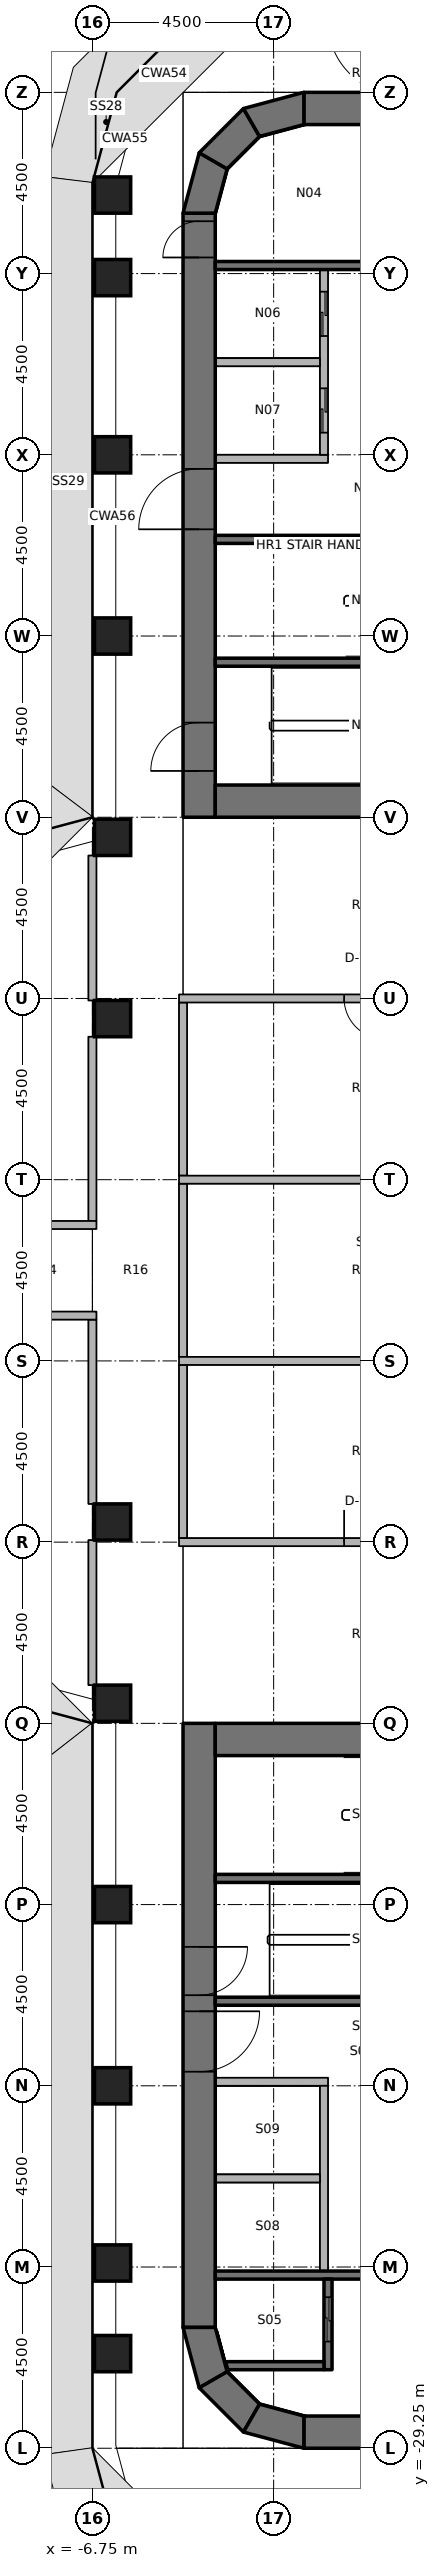
"""IFC4 building model, lengths in metres.
Left out: names, types, materials, properties, quantities, classifications, styles, units other than length and angle.
Written with IfcOpenShell. Run it as: python <this file> out.ifc"""

import sys

from ifc_helpers import new_model, si_unit, direction, frame, frame_2d, origin, origin_2d, place, context, subcontext, project, spatial, polyline, rectangle, outline, extrude, element, fill, save


model = new_model("IFC4")
c1 = context("Model", 3, precision=1e-05, world=origin(), true_north=direction((0.0, 1.0)))
c2 = subcontext(c1, "Body", "Model", "MODEL_VIEW")
j1 = project(units=[si_unit("LENGTHUNIT", "METRE"), si_unit("PLANEANGLEUNIT", "RADIAN")], contexts=[c1])
p1 = place(None, origin())
s1 = spatial("IfcSite", under=j1, at=p1, CompositionType="ELEMENT")
p2 = place(p1, origin())
s2 = spatial("IfcBuilding", under=s1, at=p2, CompositionType="ELEMENT")
p3 = place(p2, frame((0.0, 0.0, 94.2)))
s3 = spatial("IfcBuildingStorey", under=s2, at=p3, CompositionType="ELEMENT", Elevation=94.2)
for number, where, z_axis, x_axis in (
    (1, (-6.25, -26.9, 0.0), (0.0, 0.0, 1.0), (1.0, 0.0, 0.0)),
    (2, (-6.25, -24.65, 0.0), (0.0, 0.0, 1.0), (1.0, 0.0, 0.0)),
    (3, (-6.25, -20.25, 0.0), (0.0, 0.0, 1.0), (1.0, 0.0, 0.0)),
    (4, (-6.25, -15.75, 0.0), (0.0, 0.0, 1.0), (1.0, 0.0, 0.0)),
    (5, (-6.25, -10.75, 0.0), (0.0, 0.0, 1.0), (1.0, 0.0, 0.0)),
    (6, (-6.25, -6.25, 0.0), (0.0, 0.0, 1.0), (1.0, 0.0, 0.0)),
    (7, (-6.25, 6.25, 0.0), (0.0, 0.0, 1.0), (1.0, 0.0, 0.0)),
    (8, (-6.25, 10.75, 0.0), (0.0, 0.0, 1.0), (1.0, 0.0, 0.0)),
    (9, (-6.25, 15.75, 0.0), (0.0, 0.0, 1.0), (1.0, 0.0, 0.0)),
    (10, (-6.25, 20.25, 0.0), (0.0, 0.0, 1.0), (1.0, 0.0, 0.0)),
    (11, (-6.25, 24.65, 0.0), (0.0, 0.0, 1.0), (1.0, 0.0, 0.0)),
    (12, (-6.25, 26.7, 0.0), (0.0, 0.0, 1.0), (1.0, 0.0, 0.0)),
):
    element("IfcColumn", number, at=place(p3, frame(where, z_axis=z_axis, x_axis=x_axis)), inside=s3, PredefinedType="COLUMN", context=c2, shape_type="SweptSolid", body=[
        extrude(rectangle(XDim=0.9, YDim=0.9, at=origin_2d()), origin(), (0.0, 0.0, 1.0), 3.65),
    ])
p4 = place(p3, frame((-4.1, 11.25, 0.0), z_axis=(0.0, 0.0, 1.0), x_axis=(0.0, 1.0, 0.0)))
e13 = element("IfcWall", 13, at=p4, inside=s3, PredefinedType="SHEAR", context=c2, shape_type="SweptSolid", body=[
    extrude(rectangle(XDim=15.0, YDim=0.8, at=frame_2d((7.5, 0.0))), origin(), (0.0, 0.0, 1.0), 3.8),
])
p5 = place(p4, frame((7.15, 0.0, 0.0)))
e14 = element("IfcOpeningElement", 14, at=p5, cuts=e13, PredefinedType="OPENING", context=c2, shape_type="SweptSolid", body=[
    extrude(rectangle(XDim=1.5, YDim=2.3, at=frame_2d((0.75, 1.15))), frame((0.0, 0.41, 0.0), z_axis=(0.0, -1.0, 0.0), x_axis=(1.0, 0.0, 0.0)), (0.0, 0.0, 1.0), 0.82),
])
p6 = place(p4, frame((13.9, 0.0, 0.0)))
e15 = element("IfcOpeningElement", 15, at=p6, cuts=e13, PredefinedType="OPENING", context=c2, shape_type="SweptSolid", body=[
    extrude(rectangle(XDim=0.9, YDim=2.1, at=frame_2d((0.45, 1.05))), frame((0.0, 0.41, 0.0), z_axis=(0.0, -1.0, 0.0), x_axis=(1.0, 0.0, 0.0)), (0.0, 0.0, 1.0), 0.82),
])
p7 = place(p4, frame((1.15, 0.0, 0.0)))
e16 = element("IfcOpeningElement", 16, at=p7, cuts=e13, PredefinedType="OPENING", context=c2, shape_type="SweptSolid", body=[
    extrude(rectangle(XDim=1.2, YDim=2.1, at=frame_2d((0.6, 1.05))), frame((0.0, 0.41, 0.0), z_axis=(0.0, -1.0, 0.0), x_axis=(1.0, 0.0, 0.0)), (0.0, 0.0, 1.0), 0.82),
])
p8 = place(p3, frame((-3.7, 11.65, 0.0), z_axis=(0.0, 0.0, 1.0), x_axis=(1.0, 0.0, 0.0)))
e17 = element("IfcWall", 17, at=p8, inside=s3, PredefinedType="SHEAR", context=c2, shape_type="SweptSolid", body=[
    extrude(rectangle(XDim=7.4, YDim=0.8, at=frame_2d((3.7, 0.0))), origin(), (0.0, 0.0, 1.0), 3.8),
])
p9 = place(p3, frame((-1.5, 28.85, 0.0), z_axis=(0.0, 0.0, 1.0), x_axis=(1.0, 0.0, 0.0)))
e18 = element("IfcWall", 18, at=p9, inside=s3, PredefinedType="SHEAR", context=c2, shape_type="SweptSolid", body=[
    extrude(rectangle(XDim=3.0, YDim=0.8, at=frame_2d((1.5, 0.0))), origin(), (0.0, 0.0, 1.0), 3.8),
])
p10 = place(p3, origin())
e19 = element("IfcWall", 19, at=p10, inside=s3, PredefinedType="SHEAR", context=c2, shape_type="SweptSolid", body=[
    extrude(outline(polyline([(-4.5, 26.25), (-4.098, 27.75), (-3.405, 27.35), (-3.7, 26.25), (-4.5, 26.25)])), origin(), (0.0, 0.0, 1.0), 3.8),
])
p11 = place(p3, origin())
e20 = element("IfcWall", 20, at=p11, inside=s3, PredefinedType="SHEAR", context=c2, shape_type="SweptSolid", body=[
    extrude(outline(polyline([(-4.098, 27.75), (-3.0, 28.848), (-2.6, 28.155), (-3.405, 27.35), (-4.098, 27.75)])), origin(), (0.0, 0.0, 1.0), 3.8),
])
p12 = place(p3, origin())
e21 = element("IfcWall", 21, at=p12, inside=s3, PredefinedType="SHEAR", context=c2, shape_type="SweptSolid", body=[
    extrude(outline(polyline([(-3.0, 28.848), (-1.5, 29.25), (-1.5, 28.45), (-2.6, 28.155), (-3.0, 28.848)])), origin(), (0.0, 0.0, 1.0), 3.8),
])
p13 = place(p3, frame((-4.1, -11.25, 0.0), z_axis=(0.0, 0.0, 1.0), x_axis=(0.0, -1.0, 0.0)))
e22 = element("IfcWall", 22, at=p13, inside=s3, PredefinedType="SHEAR", context=c2, shape_type="SweptSolid", body=[
    extrude(rectangle(XDim=15.0, YDim=0.8, at=frame_2d((7.5, 0.0))), origin(), (0.0, 0.0, 1.0), 3.8),
])
p14 = place(p13, frame((7.15, 0.0, 0.0)))
e23 = element("IfcOpeningElement", 23, at=p14, cuts=e22, PredefinedType="OPENING", context=c2, shape_type="SweptSolid", body=[
    extrude(rectangle(XDim=1.5, YDim=2.3, at=frame_2d((0.75, 1.15))), frame((0.0, 0.41, 0.0), z_axis=(0.0, -1.0, 0.0), x_axis=(1.0, 0.0, 0.0)), (0.0, 0.0, 1.0), 0.82),
])
p15 = place(p13, frame((5.55, 0.0, 0.0)))
e24 = element("IfcOpeningElement", 24, at=p15, cuts=e22, PredefinedType="OPENING", context=c2, shape_type="SweptSolid", body=[
    extrude(rectangle(XDim=1.2, YDim=2.1, at=frame_2d((0.6, 1.05))), frame((0.0, 0.41, 0.0), z_axis=(0.0, -1.0, 0.0), x_axis=(1.0, 0.0, 0.0)), (0.0, 0.0, 1.0), 0.82),
])
p16 = place(p3, frame((-3.7, -11.65, 0.0), z_axis=(0.0, 0.0, 1.0), x_axis=(1.0, 0.0, 0.0)))
e25 = element("IfcWall", 25, at=p16, inside=s3, PredefinedType="SHEAR", context=c2, shape_type="SweptSolid", body=[
    extrude(rectangle(XDim=7.4, YDim=0.8, at=frame_2d((3.7, 0.0))), origin(), (0.0, 0.0, 1.0), 3.8),
])
p17 = place(p3, frame((-1.5, -28.85, 0.0), z_axis=(0.0, 0.0, 1.0), x_axis=(1.0, 0.0, 0.0)))
e26 = element("IfcWall", 26, at=p17, inside=s3, PredefinedType="SHEAR", context=c2, shape_type="SweptSolid", body=[
    extrude(rectangle(XDim=3.0, YDim=0.8, at=frame_2d((1.5, 0.0))), origin(), (0.0, 0.0, 1.0), 3.8),
])
p18 = place(p3, origin())
e27 = element("IfcWall", 27, at=p18, inside=s3, PredefinedType="SHEAR", context=c2, shape_type="SweptSolid", body=[
    extrude(outline(polyline([(-4.5, -26.25), (-4.098, -27.75), (-3.405, -27.35), (-3.7, -26.25), (-4.5, -26.25)])), origin(), (0.0, 0.0, 1.0), 3.8),
])
p19 = place(p3, origin())
e28 = element("IfcWall", 28, at=p19, inside=s3, PredefinedType="SHEAR", context=c2, shape_type="SweptSolid", body=[
    extrude(outline(polyline([(-4.098, -27.75), (-3.0, -28.848), (-2.6, -28.155), (-3.405, -27.35), (-4.098, -27.75)])), origin(), (0.0, 0.0, 1.0), 3.8),
])
p20 = place(p3, origin())
e29 = element("IfcWall", 29, at=p20, inside=s3, PredefinedType="SHEAR", context=c2, shape_type="SweptSolid", body=[
    extrude(outline(polyline([(-3.0, -28.848), (-1.5, -29.25), (-1.5, -28.45), (-2.6, -28.155), (-3.0, -28.848)])), origin(), (0.0, 0.0, 1.0), 3.8),
])
for number, where, z_axis, x_axis in (
    (30, (-3.7, 24.95, 0.0), (0.0, 0.0, 1.0), (1.0, 0.0, 0.0)),
    (31, (-3.7, 18.15, 0.0), (0.0, 0.0, 1.0), (1.0, 0.0, 0.0)),
    (32, (-3.7, 15.1, 0.0), (0.0, 0.0, 1.0), (1.0, 0.0, 0.0)),
):
    element("IfcWall", number, at=place(p3, frame(where, z_axis=z_axis, x_axis=x_axis)), inside=s3, PredefinedType="SHEAR", context=c2, shape_type="SweptSolid", body=[
        extrude(rectangle(XDim=7.4, YDim=0.2, at=frame_2d((3.7, 0.0))), origin(), (0.0, 0.0, 1.0), 3.65),
    ])
p21 = place(p3, frame((-3.7, 20.15, 0.0), z_axis=(0.0, 0.0, 1.0), x_axis=(1.0, 0.0, 0.0)))
e33 = element("IfcWall", 33, at=p21, inside=s3, PredefinedType="PARTITIONING", context=c2, shape_type="SweptSolid", body=[
    extrude(rectangle(XDim=2.8, YDim=0.2, at=frame_2d((1.4, 0.0))), origin(), (0.0, 0.0, 1.0), 3.65),
])
p22 = place(p3, frame((-1.0, 24.85, 0.0), z_axis=(0.0, 0.0, 1.0), x_axis=(0.0, -1.0, 0.0)))
e34 = element("IfcWall", 34, at=p22, inside=s3, PredefinedType="PARTITIONING", context=c2, shape_type="SweptSolid", body=[
    extrude(rectangle(XDim=4.6, YDim=0.2, at=frame_2d((2.3, 0.0))), origin(), (0.0, 0.0, 1.0), 3.65),
])
p23 = place(p22, frame((0.55, 0.0, 0.0)))
e35 = element("IfcOpeningElement", 35, at=p23, cuts=e34, PredefinedType="OPENING", context=c2, shape_type="SweptSolid", body=[
    extrude(rectangle(XDim=1.1, YDim=2.3, at=frame_2d((0.55, 1.15))), frame((0.0, 0.11, 0.0), z_axis=(0.0, -1.0, 0.0), x_axis=(1.0, 0.0, 0.0)), (0.0, 0.0, 1.0), 0.22),
])
p24 = place(p22, frame((2.95, 0.0, 0.0)))
e36 = element("IfcOpeningElement", 36, at=p24, cuts=e34, PredefinedType="OPENING", context=c2, shape_type="SweptSolid", body=[
    extrude(rectangle(XDim=1.1, YDim=2.3, at=frame_2d((0.55, 1.15))), frame((0.0, 0.11, 0.0), z_axis=(0.0, -1.0, 0.0), x_axis=(1.0, 0.0, 0.0)), (0.0, 0.0, 1.0), 0.22),
])
p25 = place(p3, frame((-3.7, 22.55, 0.0), z_axis=(0.0, 0.0, 1.0), x_axis=(1.0, 0.0, 0.0)))
e37 = element("IfcWall", 37, at=p25, inside=s3, PredefinedType="PARTITIONING", context=c2, shape_type="SweptSolid", body=[
    extrude(rectangle(XDim=2.6, YDim=0.2, at=frame_2d((1.3, 0.0))), origin(), (0.0, 0.0, 1.0), 3.65),
])
p26 = place(p3, frame((3.7, -24.95, 0.0), z_axis=(0.0, 0.0, 1.0), x_axis=(-1.0, 0.0, 0.0)))
e38 = element("IfcWall", 38, at=p26, inside=s3, PredefinedType="SHEAR", context=c2, shape_type="SweptSolid", body=[
    extrude(rectangle(XDim=7.4, YDim=0.2, at=frame_2d((3.7, 0.0))), origin(), (0.0, 0.0, 1.0), 3.65),
])
p27 = place(p3, frame((-0.9, -27.3, 0.0), z_axis=(0.0, 0.0, 1.0), x_axis=(0.0, 1.0, 0.0)))
e39 = element("IfcWall", 39, at=p27, inside=s3, PredefinedType="SHEAR", context=c2, shape_type="SweptSolid", body=[
    extrude(rectangle(XDim=2.25, YDim=0.2, at=frame_2d((1.125, 0.0))), origin(), (0.0, 0.0, 1.0), 3.65),
])
p28 = place(p27, frame((0.7, 0.0, 0.0)))
e40 = element("IfcOpeningElement", 40, at=p28, cuts=e39, PredefinedType="OPENING", context=c2, shape_type="SweptSolid", body=[
    extrude(rectangle(XDim=1.1, YDim=2.3, at=frame_2d((0.55, 1.15))), frame((0.0, 0.11, 0.0), z_axis=(0.0, -1.0, 0.0), x_axis=(1.0, 0.0, 0.0)), (0.0, 0.0, 1.0), 0.22),
])
p29 = place(p3, origin())
e41 = element("IfcWall", 41, at=p29, inside=s3, PredefinedType="SHEAR", context=c2, shape_type="SweptSolid", body=[
    extrude(outline(polyline([(-1.0, -27.1), (-3.444, -27.1), (-3.39, -27.3), (-1.0, -27.3), (-1.0, -27.1)])), origin(), (0.0, 0.0, 1.0), 3.65),
])
for number, where, z_axis, x_axis in (
    (42, (3.7, -18.15, 0.0), (0.0, 0.0, 1.0), (-1.0, 0.0, 0.0)),
    (43, (3.7, -15.1, 0.0), (0.0, 0.0, 1.0), (-1.0, 0.0, 0.0)),
):
    element("IfcWall", number, at=place(p3, frame(where, z_axis=z_axis, x_axis=x_axis)), inside=s3, PredefinedType="SHEAR", context=c2, shape_type="SweptSolid", body=[
        extrude(rectangle(XDim=7.4, YDim=0.2, at=frame_2d((3.7, 0.0))), origin(), (0.0, 0.0, 1.0), 3.65),
    ])
p30 = place(p3, frame((-0.9, -20.15, 0.0), z_axis=(0.0, 0.0, 1.0), x_axis=(-1.0, 0.0, 0.0)))
e44 = element("IfcWall", 44, at=p30, inside=s3, PredefinedType="PARTITIONING", context=c2, shape_type="SweptSolid", body=[
    extrude(rectangle(XDim=2.8, YDim=0.2, at=frame_2d((1.4, 0.0))), origin(), (0.0, 0.0, 1.0), 3.65),
])
p31 = place(p3, frame((-1.0, -24.85, 0.0), z_axis=(0.0, 0.0, 1.0), x_axis=(0.0, 1.0, 0.0)))
e45 = element("IfcWall", 45, at=p31, inside=s3, PredefinedType="PARTITIONING", context=c2, shape_type="SweptSolid", body=[
    extrude(rectangle(XDim=4.6, YDim=0.2, at=frame_2d((2.3, 0.0))), origin(), (0.0, 0.0, 1.0), 3.65),
])
p32 = place(p3, frame((-1.1, -22.55, 0.0), z_axis=(0.0, 0.0, 1.0), x_axis=(-1.0, 0.0, 0.0)))
e46 = element("IfcWall", 46, at=p32, inside=s3, PredefinedType="PARTITIONING", context=c2, shape_type="SweptSolid", body=[
    extrude(rectangle(XDim=2.6, YDim=0.2, at=frame_2d((1.3, 0.0))), origin(), (0.0, 0.0, 1.0), 3.65),
])
for number, where, z_axis, x_axis in (
    (47, (-4.5, 2.35, 0.0), (0.0, 0.0, 1.0), (0.0, 1.0, 0.0)),
    (48, (-4.5, -2.15, 0.0), (0.0, 0.0, 1.0), (0.0, 1.0, 0.0)),
    (49, (-4.5, -6.65, 0.0), (0.0, 0.0, 1.0), (0.0, 1.0, 0.0)),
):
    element("IfcWall", number, at=place(p3, frame(where, z_axis=z_axis, x_axis=x_axis)), inside=s3, PredefinedType="PARTITIONING", context=c2, shape_type="SweptSolid", body=[
        extrude(rectangle(XDim=4.3, YDim=0.2, at=frame_2d((2.15, 0.0))), origin(), (0.0, 0.0, 1.0), 2.738),
    ])
p33 = place(p3, frame((-6.75, 1.225, 0.0), z_axis=(0.0, 0.0, 1.0), x_axis=(0.0, 1.0, 0.0)))
e50 = element("IfcWall", 50, at=p33, inside=s3, PredefinedType="PARTITIONING", context=c2, shape_type="SweptSolid", body=[
    extrude(rectangle(XDim=4.575, YDim=0.2, at=frame_2d((2.288, 0.0))), origin(), (0.0, 0.0, 1.0), 2.738),
])
for number, where, z_axis, x_axis in (
    (51, (-6.75, 6.7, 0.0), (0.0, 0.0, 1.0), (0.0, 1.0, 0.0)),
    (52, (-6.75, -10.3, 0.0), (0.0, 0.0, 1.0), (0.0, 1.0, 0.0)),
):
    element("IfcWall", number, at=place(p3, frame(where, z_axis=z_axis, x_axis=x_axis)), inside=s3, PredefinedType="PARTITIONING", context=c2, shape_type="SweptSolid", body=[
        extrude(rectangle(XDim=3.6, YDim=0.2, at=frame_2d((1.8, 0.0))), origin(), (0.0, 0.0, 1.0), 2.738),
    ])
p34 = place(p3, frame((-6.75, -5.8, 0.0), z_axis=(0.0, 0.0, 1.0), x_axis=(0.0, 1.0, 0.0)))
e53 = element("IfcWall", 53, at=p34, inside=s3, PredefinedType="PARTITIONING", context=c2, shape_type="SweptSolid", body=[
    extrude(rectangle(XDim=4.575, YDim=0.2, at=frame_2d((2.288, 0.0))), origin(), (0.0, 0.0, 1.0), 2.738),
])
p35 = place(p3, frame((4.6, 6.75, 0.0), z_axis=(0.0, 0.0, 1.0), x_axis=(-1.0, 0.0, 0.0)))
e54 = element("IfcWall", 54, at=p35, inside=s3, PredefinedType="PARTITIONING", context=c2, shape_type="SweptSolid", body=[
    extrude(rectangle(XDim=9.2, YDim=0.2, at=frame_2d((4.6, 0.0))), origin(), (0.0, 0.0, 1.0), 2.738),
])
p36 = place(p35, frame((4.1, 0.0, 0.0)))
e55 = element("IfcOpeningElement", 55, at=p36, cuts=e54, PredefinedType="OPENING", context=c2, shape_type="SweptSolid", body=[
    extrude(rectangle(XDim=1.0, YDim=2.1, at=frame_2d((0.5, 1.05))), frame((0.0, 0.11, 0.0), z_axis=(0.0, -1.0, 0.0), x_axis=(1.0, 0.0, 0.0)), (0.0, 0.0, 1.0), 0.22),
])
p37 = place(p3, frame((-4.6, -6.75, 0.0), z_axis=(0.0, 0.0, 1.0), x_axis=(1.0, 0.0, 0.0)))
e56 = element("IfcWall", 56, at=p37, inside=s3, PredefinedType="PARTITIONING", context=c2, shape_type="SweptSolid", body=[
    extrude(rectangle(XDim=9.2, YDim=0.2, at=frame_2d((4.6, 0.0))), origin(), (0.0, 0.0, 1.0), 2.738),
])
p38 = place(p37, frame((4.1, 0.0, 0.0)))
e57 = element("IfcOpeningElement", 57, at=p38, cuts=e56, PredefinedType="OPENING", context=c2, shape_type="SweptSolid", body=[
    extrude(rectangle(XDim=1.0, YDim=2.1, at=frame_2d((0.5, 1.05))), frame((0.0, 0.11, 0.0), z_axis=(0.0, -1.0, 0.0), x_axis=(1.0, 0.0, 0.0)), (0.0, 0.0, 1.0), 0.22),
])
for number, where, z_axis, x_axis in (
    (58, (-4.6, 2.25, 0.0), (0.0, 0.0, 1.0), (1.0, 0.0, 0.0)),
    (59, (-4.6, -2.25, 0.0), (0.0, 0.0, 1.0), (1.0, 0.0, 0.0)),
):
    element("IfcWall", number, at=place(p3, frame(where, z_axis=z_axis, x_axis=x_axis)), inside=s3, PredefinedType="PARTITIONING", context=c2, shape_type="SweptSolid", body=[
        extrude(rectangle(XDim=9.2, YDim=0.2, at=frame_2d((4.6, 0.0))), origin(), (0.0, 0.0, 1.0), 2.738),
    ])
p39 = place(p3, frame((-11.35, 1.125, 0.0), z_axis=(0.0, 0.0, 1.0), x_axis=(1.0, 0.0, 0.0)))
e60 = element("IfcWall", 60, at=p39, inside=s3, PredefinedType="PARTITIONING", context=c2, shape_type="SweptSolid", body=[
    extrude(rectangle(XDim=4.7, YDim=0.2, at=frame_2d((2.35, 0.0))), origin(), (0.0, 0.0, 1.0), 2.738),
])
p40 = place(p39, frame((1.85, 0.0, 0.0)))
e61 = element("IfcOpeningElement", 61, at=p40, cuts=e60, PredefinedType="OPENING", context=c2, shape_type="SweptSolid", body=[
    extrude(rectangle(XDim=1.0, YDim=2.1, at=frame_2d((0.5, 1.05))), frame((0.0, 0.11, 0.0), z_axis=(0.0, -1.0, 0.0), x_axis=(1.0, 0.0, 0.0)), (0.0, 0.0, 1.0), 0.22),
])
p41 = place(p3, frame((-6.65, -1.125, 0.0), z_axis=(0.0, 0.0, 1.0), x_axis=(-1.0, 0.0, 0.0)))
e62 = element("IfcWall", 62, at=p41, inside=s3, PredefinedType="PARTITIONING", context=c2, shape_type="SweptSolid", body=[
    extrude(rectangle(XDim=4.7, YDim=0.2, at=frame_2d((2.35, 0.0))), origin(), (0.0, 0.0, 1.0), 2.738),
])
p42 = place(p41, frame((1.85, 0.0, 0.0)))
e63 = element("IfcOpeningElement", 63, at=p42, cuts=e62, PredefinedType="OPENING", context=c2, shape_type="SweptSolid", body=[
    extrude(rectangle(XDim=1.0, YDim=2.1, at=frame_2d((0.5, 1.05))), frame((0.0, 0.11, 0.0), z_axis=(0.0, -1.0, 0.0), x_axis=(1.0, 0.0, 0.0)), (0.0, 0.0, 1.0), 0.22),
])
p43 = place(p5, origin())
e64 = element("IfcDoor", 64, at=p43, inside=s3, OperationType="DOUBLE_DOOR_SINGLE_SWING", PredefinedType="DOOR", context=c2, shape_type="SweptSolid", body=[
    extrude(rectangle(XDim=1.5, YDim=2.3, at=frame_2d((0.75, 1.15))), frame((0.0, 0.025, 0.0), z_axis=(0.0, -1.0, 0.0), x_axis=(1.0, 0.0, 0.0)), (0.0, 0.0, 1.0), 0.05),
])
fill(e14, e64)
p44 = place(p6, origin())
e65 = element("IfcDoor", 65, at=p44, inside=s3, OperationType="SINGLE_SWING_RIGHT", PredefinedType="DOOR", context=c2, shape_type="SweptSolid", body=[
    extrude(rectangle(XDim=0.9, YDim=2.1, at=frame_2d((0.45, 1.05))), frame((0.0, 0.025, 0.0), z_axis=(0.0, -1.0, 0.0), x_axis=(1.0, 0.0, 0.0)), (0.0, 0.0, 1.0), 0.05),
])
fill(e15, e65)
p45 = place(p7, origin())
e66 = element("IfcDoor", 66, at=p45, inside=s3, OperationType="SINGLE_SWING_RIGHT", PredefinedType="DOOR", context=c2, shape_type="SweptSolid", body=[
    extrude(rectangle(XDim=1.2, YDim=2.1, at=frame_2d((0.6, 1.05))), frame((0.0, 0.025, 0.0), z_axis=(0.0, -1.0, 0.0), x_axis=(1.0, 0.0, 0.0)), (0.0, 0.0, 1.0), 0.05),
])
fill(e16, e66)
p46 = place(p23, origin())
e67 = element("IfcDoor", 67, at=p46, inside=s3, OperationType="DOUBLE_DOOR_SLIDING", PredefinedType="DOOR", context=c2, shape_type="SweptSolid", body=[
    extrude(rectangle(XDim=1.1, YDim=2.3, at=frame_2d((0.55, 1.15))), frame((0.0, 0.025, 0.0), z_axis=(0.0, -1.0, 0.0), x_axis=(1.0, 0.0, 0.0)), (0.0, 0.0, 1.0), 0.05),
])
fill(e35, e67)
p47 = place(p24, origin())
e68 = element("IfcDoor", 68, at=p47, inside=s3, OperationType="DOUBLE_DOOR_SLIDING", PredefinedType="DOOR", context=c2, shape_type="SweptSolid", body=[
    extrude(rectangle(XDim=1.1, YDim=2.3, at=frame_2d((0.55, 1.15))), frame((0.0, 0.025, 0.0), z_axis=(0.0, -1.0, 0.0), x_axis=(1.0, 0.0, 0.0)), (0.0, 0.0, 1.0), 0.05),
])
fill(e36, e68)
p48 = place(p14, origin())
e69 = element("IfcDoor", 69, at=p48, inside=s3, OperationType="DOUBLE_DOOR_SINGLE_SWING", PredefinedType="DOOR", context=c2, shape_type="SweptSolid", body=[
    extrude(rectangle(XDim=1.5, YDim=2.3, at=frame_2d((0.75, 1.15))), frame((0.0, 0.025, 0.0), z_axis=(0.0, -1.0, 0.0), x_axis=(1.0, 0.0, 0.0)), (0.0, 0.0, 1.0), 0.05),
])
fill(e23, e69)
p49 = place(p15, origin())
e70 = element("IfcDoor", 70, at=p49, inside=s3, OperationType="SINGLE_SWING_LEFT", PredefinedType="DOOR", context=c2, shape_type="SweptSolid", body=[
    extrude(rectangle(XDim=1.2, YDim=2.1, at=frame_2d((0.6, 1.05))), frame((0.0, 0.025, 0.0), z_axis=(0.0, -1.0, 0.0), x_axis=(1.0, 0.0, 0.0)), (0.0, 0.0, 1.0), 0.05),
])
fill(e24, e70)
p50 = place(p28, origin())
e71 = element("IfcDoor", 71, at=p50, inside=s3, OperationType="DOUBLE_DOOR_SLIDING", PredefinedType="DOOR", context=c2, shape_type="SweptSolid", body=[
    extrude(rectangle(XDim=1.1, YDim=2.3, at=frame_2d((0.55, 1.15))), frame((0.0, 0.025, 0.0), z_axis=(0.0, -1.0, 0.0), x_axis=(1.0, 0.0, 0.0)), (0.0, 0.0, 1.0), 0.05),
])
fill(e40, e71)
p51 = place(p36, origin())
e72 = element("IfcDoor", 72, at=p51, inside=s3, OperationType="SINGLE_SWING_RIGHT", PredefinedType="DOOR", context=c2, shape_type="SweptSolid", body=[
    extrude(rectangle(XDim=1.0, YDim=2.1, at=frame_2d((0.5, 1.05))), frame((0.0, 0.025, 0.0), z_axis=(0.0, -1.0, 0.0), x_axis=(1.0, 0.0, 0.0)), (0.0, 0.0, 1.0), 0.05),
])
fill(e55, e72)
p52 = place(p38, origin())
e73 = element("IfcDoor", 73, at=p52, inside=s3, OperationType="SINGLE_SWING_RIGHT", PredefinedType="DOOR", context=c2, shape_type="SweptSolid", body=[
    extrude(rectangle(XDim=1.0, YDim=2.1, at=frame_2d((0.5, 1.05))), frame((0.0, 0.025, 0.0), z_axis=(0.0, -1.0, 0.0), x_axis=(1.0, 0.0, 0.0)), (0.0, 0.0, 1.0), 0.05),
])
fill(e57, e73)
save(model, sys.argv[1])
